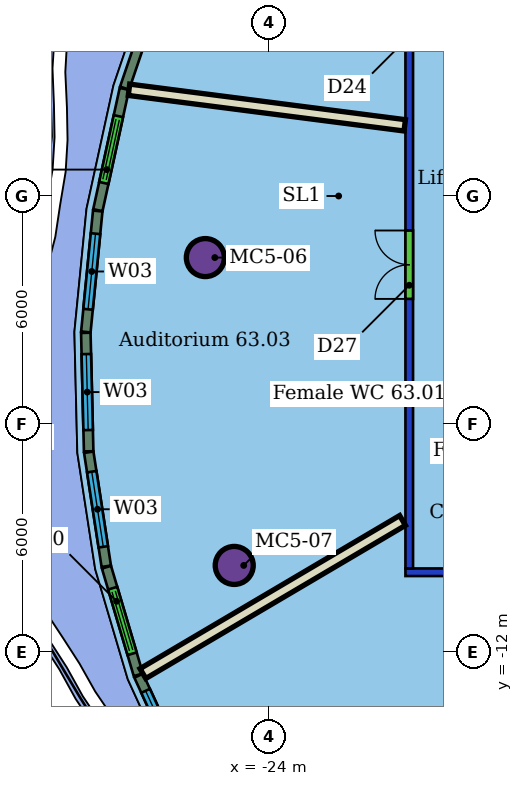
"""IFC4 building model, lengths in metres.
Left out: names, types, materials, properties, quantities, classifications, styles, units other than length and angle.
Written with IfcOpenShell. Run it as: python <this file> out.ifc"""

import sys

from ifc_helpers import new_model, si_unit, direction, frame, frame_2d, origin, origin_2d, place, context, subcontext, project, spatial, rectangle, hollow_circle, extrude, element, fill, save


model = new_model("IFC4")
c1 = context("Model", 3, precision=1e-05, world=origin(), true_north=direction((0.0, 1.0)))
c2 = subcontext(c1, "Body", "Model", "MODEL_VIEW")
j1 = project(units=[si_unit("LENGTHUNIT", "METRE"), si_unit("PLANEANGLEUNIT", "RADIAN")], contexts=[c1])
p1 = place(None, origin())
s1 = spatial("IfcSite", under=j1, at=p1, CompositionType="ELEMENT")
p2 = place(p1, origin())
s2 = spatial("IfcBuilding", under=s1, at=p2, CompositionType="ELEMENT")
p3 = place(p2, frame((0.0, 0.0, 257.7)))
s3 = spatial("IfcBuildingStorey", under=s2, at=p3, CompositionType="ELEMENT", Elevation=257.7)
for number, where, z_axis, x_axis in (
    (1, (-25.666, -1.62, 0.0), (0.0, 0.0, 1.0), (1.0, 0.0, 0.0)),
    (2, (-24.906, -9.72, 0.0), (0.0, 0.0, 1.0), (1.0, 0.0, 0.0)),
):
    element("IfcColumn", number, at=place(p3, frame(where, z_axis=z_axis, x_axis=x_axis)), inside=s3, PredefinedType="COLUMN", context=c2, shape_type="SweptSolid", body=[
        extrude(hollow_circle(Radius=0.5, WallThickness=0.04, at=origin_2d()), origin(), (0.0, 0.0, 1.0), 3.45),
    ])
p4 = place(p3, frame((8.4, -9.9, 0.0), z_axis=(0.0, 0.0, 1.0), x_axis=(-1.0, 0.0, 0.0)))
e3 = element("IfcWall", 3, at=p4, inside=s3, PredefinedType="PARTITIONING", context=c2, shape_type="SweptSolid", body=[
    extrude(rectangle(XDim=28.8, YDim=0.2, at=frame_2d((14.4, 0.0))), origin(), (0.0, 0.0, 1.0), 3.1),
])
p5 = place(p4, frame((23.159, 0.0, 0.0)))
e4 = element("IfcOpeningElement", 4, at=p5, cuts=e3, PredefinedType="OPENING", context=c2, shape_type="SweptSolid", body=[
    extrude(rectangle(XDim=1.8, YDim=2.4, at=frame_2d((0.9, 1.2))), frame((0.0, 0.11, 0.0), z_axis=(0.0, -1.0, 0.0), x_axis=(1.0, 0.0, 0.0)), (0.0, 0.0, 1.0), 0.22),
])
p6 = place(p4, frame((17.296, 0.0, 0.0)))
e5 = element("IfcOpeningElement", 5, at=p6, cuts=e3, PredefinedType="OPENING", context=c2, shape_type="SweptSolid", body=[
    extrude(rectangle(XDim=1.5, YDim=2.4, at=frame_2d((0.75, 1.2))), frame((0.0, 0.11, 0.0), z_axis=(0.0, -1.0, 0.0), x_axis=(1.0, 0.0, 0.0)), (0.0, 0.0, 1.0), 0.22),
])
p7 = place(p4, frame((8.284, 0.0, 0.0)))
e6 = element("IfcOpeningElement", 6, at=p7, cuts=e3, PredefinedType="OPENING", context=c2, shape_type="SweptSolid", body=[
    extrude(rectangle(XDim=0.9, YDim=2.1, at=frame_2d((0.45, 1.05))), frame((0.0, 0.11, 0.0), z_axis=(0.0, -1.0, 0.0), x_axis=(1.0, 0.0, 0.0)), (0.0, 0.0, 1.0), 0.22),
])
p8 = place(p4, frame((3.497, 0.0, 0.0)))
e7 = element("IfcOpeningElement", 7, at=p8, cuts=e3, PredefinedType="OPENING", context=c2, shape_type="SweptSolid", body=[
    extrude(rectangle(XDim=1.5, YDim=2.1, at=frame_2d((0.75, 1.05))), frame((0.0, 0.11, 0.0), z_axis=(0.0, -1.0, 0.0), x_axis=(1.0, 0.0, 0.0)), (0.0, 0.0, 1.0), 0.22),
])
p9 = place(p3, frame((-20.3, -9.8, 0.0), z_axis=(0.0, 0.0, 1.0), x_axis=(0.0, 1.0, 0.0)))
e8 = element("IfcWall", 8, at=p9, inside=s3, PredefinedType="PARTITIONING", context=c2, shape_type="SweptSolid", body=[
    extrude(rectangle(XDim=19.6, YDim=0.2, at=frame_2d((9.8, 0.0))), origin(), (0.0, 0.0, 1.0), 3.1),
])
p10 = place(p9, frame((13.85, 0.0, 0.0)))
e9 = element("IfcOpeningElement", 9, at=p10, cuts=e8, PredefinedType="OPENING", context=c2, shape_type="SweptSolid", body=[
    extrude(rectangle(XDim=1.5, YDim=2.1, at=frame_2d((0.75, 1.05))), frame((0.0, 0.11, 0.0), z_axis=(0.0, -1.0, 0.0), x_axis=(1.0, 0.0, 0.0)), (0.0, 0.0, 1.0), 0.22),
])
p11 = place(p9, frame((7.092, 0.0, 0.0)))
e10 = element("IfcOpeningElement", 10, at=p11, cuts=e8, PredefinedType="OPENING", context=c2, shape_type="SweptSolid", body=[
    extrude(rectangle(XDim=1.8, YDim=2.4, at=frame_2d((0.9, 1.2))), frame((0.0, 0.11, 0.0), z_axis=(0.0, -1.0, 0.0), x_axis=(1.0, 0.0, 0.0)), (0.0, 0.0, 1.0), 0.22),
])
p12 = place(p3, frame((-27.674, 2.795, 0.0), z_axis=(0.0, 0.0, 1.0), x_axis=(0.991788248046, -0.127890855958, 0.0)))
e11 = element("IfcWall", 11, at=p12, inside=s3, PredefinedType="PARTITIONING", context=c2, shape_type="SweptSolid", body=[
    extrude(rectangle(XDim=7.315, YDim=0.3, at=frame_2d((3.658, 0.0))), origin(), (0.0, 0.0, 1.0), 3.45),
])
p13 = place(p3, frame((-27.309, -12.566, 0.0), z_axis=(0.0, 0.0, 1.0), x_axis=(0.861365558052, 0.507985605506, 0.0)))
e12 = element("IfcWall", 12, at=p13, inside=s3, PredefinedType="PARTITIONING", context=c2, shape_type="SweptSolid", body=[
    extrude(rectangle(XDim=7.932, YDim=0.3, at=frame_2d((3.966, 0.0))), origin(), (0.0, 0.0, 1.0), 3.45),
])
p14 = place(p3, frame((-20.565, -21.335, 0.0), z_axis=(0.0, 0.0, 1.0), x_axis=(0.563811273549, 0.825903655289, 0.0)))
e13 = element("IfcWall", 13, at=p14, inside=s3, PredefinedType="PARTITIONING", context=c2, shape_type="SweptSolid", body=[
    extrude(rectangle(XDim=13.665, YDim=0.175, at=frame_2d((6.833, 0.0))), origin(), (0.0, 0.0, 1.0), 3.45),
])
p15 = place(p3, frame((-26.737, 5.941, 0.0), z_axis=(0.0, 0.0, 1.0), x_axis=(-0.32181056212, -0.946804077995, 0.0)))
e14 = element("IfcWall", 14, at=p15, inside=s3, PredefinedType="SOLIDWALL", context=c2, shape_type="SweptSolid", body=[
    extrude(rectangle(XDim=3.277, YDim=0.25, at=frame_2d((1.638, 0.0))), origin(), (0.0, 0.0, 1.0), 3.15),
])
p16 = place(p3, frame((-27.797, 2.818, 0.0), z_axis=(0.0, 0.0, 1.0), x_axis=(-0.213366888583, -0.97697214436, 0.0)))
e15 = element("IfcWall", 15, at=p16, inside=s3, PredefinedType="SOLIDWALL", context=c2, shape_type="SweptSolid", body=[
    extrude(rectangle(XDim=3.266, YDim=0.25, at=frame_2d((1.633, 0.0))), origin(), (0.0, 0.0, 1.0), 3.15),
])
p17 = place(p16, frame((0.733, 0.0, 0.0)))
e16 = element("IfcOpeningElement", 16, at=p17, cuts=e15, PredefinedType="OPENING", context=c2, shape_type="SweptSolid", body=[
    extrude(rectangle(XDim=1.8, YDim=2.4, at=frame_2d((0.9, 1.2))), frame((0.0, 0.135, 0.0), z_axis=(0.0, -1.0, 0.0), x_axis=(1.0, 0.0, 0.0)), (0.0, 0.0, 1.0), 0.27),
])
p18 = place(p3, frame((-28.497, -0.395, 0.0), z_axis=(0.0, 0.0, 1.0), x_axis=(-0.097900668903, -0.995196191225, 0.0)))
e17 = element("IfcWall", 17, at=p18, inside=s3, PredefinedType="SOLIDWALL", context=c2, shape_type="SweptSolid", body=[
    extrude(rectangle(XDim=3.197, YDim=0.25, at=frame_2d((1.599, 0.0))), origin(), (0.0, 0.0, 1.0), 3.15),
])
p19 = place(p18, frame((0.599, 0.0, 0.9)))
e18 = element("IfcOpeningElement", 18, at=p19, cuts=e17, PredefinedType="OPENING", context=c2, shape_type="SweptSolid", body=[
    extrude(rectangle(XDim=2.0, YDim=2.1, at=frame_2d((1.0, 1.05))), frame((0.0, 0.135, 0.0), z_axis=(0.0, -1.0, 0.0), x_axis=(1.0, 0.0, 0.0)), (0.0, 0.0, 1.0), 0.27),
])
p20 = place(p3, frame((-28.811, -3.6, 0.0), z_axis=(0.0, 0.0, 1.0), x_axis=(0.024112016682, -0.999709263062, 0.0)))
e19 = element("IfcWall", 19, at=p20, inside=s3, PredefinedType="SOLIDWALL", context=c2, shape_type="SweptSolid", body=[
    extrude(rectangle(XDim=3.119, YDim=0.25, at=frame_2d((1.559, 0.0))), origin(), (0.0, 0.0, 1.0), 3.15),
])
p21 = place(p20, frame((0.559, 0.0, 0.9)))
e20 = element("IfcOpeningElement", 20, at=p21, cuts=e19, PredefinedType="OPENING", context=c2, shape_type="SweptSolid", body=[
    extrude(rectangle(XDim=2.0, YDim=2.1, at=frame_2d((1.0, 1.05))), frame((0.0, 0.135, 0.0), z_axis=(0.0, -1.0, 0.0), x_axis=(1.0, 0.0, 0.0)), (0.0, 0.0, 1.0), 0.27),
])
p22 = place(p3, frame((-28.734, -6.742, 0.0), z_axis=(0.0, 0.0, 1.0), x_axis=(0.151930263347, -0.988391215602, 0.0)))
e21 = element("IfcWall", 21, at=p22, inside=s3, PredefinedType="SOLIDWALL", context=c2, shape_type="SweptSolid", body=[
    extrude(rectangle(XDim=3.035, YDim=0.25, at=frame_2d((1.518, 0.0))), origin(), (0.0, 0.0, 1.0), 3.15),
])
p23 = place(p22, frame((0.518, 0.0, 0.9)))
e22 = element("IfcOpeningElement", 22, at=p23, cuts=e21, PredefinedType="OPENING", context=c2, shape_type="SweptSolid", body=[
    extrude(rectangle(XDim=2.0, YDim=2.1, at=frame_2d((1.0, 1.05))), frame((0.0, 0.135, 0.0), z_axis=(0.0, -1.0, 0.0), x_axis=(1.0, 0.0, 0.0)), (0.0, 0.0, 1.0), 0.27),
])
p24 = place(p3, frame((-28.267, -9.767, 0.0), z_axis=(0.0, 0.0, 1.0), x_axis=(0.283795508972, -0.958884825768, 0.0)))
e23 = element("IfcWall", 23, at=p24, inside=s3, PredefinedType="SOLIDWALL", context=c2, shape_type="SweptSolid", body=[
    extrude(rectangle(XDim=2.952, YDim=0.25, at=frame_2d((1.476, 0.0))), origin(), (0.0, 0.0, 1.0), 3.15),
])
p25 = place(p24, frame((0.576, 0.0, 0.0)))
e24 = element("IfcOpeningElement", 24, at=p25, cuts=e23, PredefinedType="OPENING", context=c2, shape_type="SweptSolid", body=[
    extrude(rectangle(XDim=1.8, YDim=2.4, at=frame_2d((0.9, 1.2))), frame((0.0, 0.135, 0.0), z_axis=(0.0, -1.0, 0.0), x_axis=(1.0, 0.0, 0.0)), (0.0, 0.0, 1.0), 0.27),
])
p26 = place(p3, frame((-27.42, -12.622, 0.0), z_axis=(0.0, 0.0, 1.0), x_axis=(0.416844676261, -0.908977731231, 0.0)))
e25 = element("IfcWall", 25, at=p26, inside=s3, PredefinedType="SOLIDWALL", context=c2, shape_type="SweptSolid", body=[
    extrude(rectangle(XDim=2.876, YDim=0.25, at=frame_2d((1.438, 0.0))), origin(), (0.0, 0.0, 1.0), 3.15),
])
p27 = place(p26, frame((0.438, 0.0, 0.9)))
e26 = element("IfcOpeningElement", 26, at=p27, cuts=e25, PredefinedType="OPENING", context=c2, shape_type="SweptSolid", body=[
    extrude(rectangle(XDim=2.0, YDim=2.1, at=frame_2d((1.0, 1.05))), frame((0.0, 0.135, 0.0), z_axis=(0.0, -1.0, 0.0), x_axis=(1.0, 0.0, 0.0)), (0.0, 0.0, 1.0), 0.27),
])
p28 = place(p11, origin())
e27 = element("IfcDoor", 27, at=p28, inside=s3, OperationType="DOUBLE_DOOR_SINGLE_SWING", PredefinedType="DOOR", context=c2, shape_type="SweptSolid", body=[
    extrude(rectangle(XDim=1.8, YDim=2.4, at=frame_2d((0.9, 1.2))), frame((0.0, 0.025, 0.0), z_axis=(0.0, -1.0, 0.0), x_axis=(1.0, 0.0, 0.0)), (0.0, 0.0, 1.0), 0.05),
])
fill(e10, e27)
p29 = place(p17, origin())
e28 = element("IfcDoor", 28, at=p29, inside=s3, OperationType="DOUBLE_DOOR_SLIDING", PredefinedType="DOOR", context=c2, shape_type="SweptSolid", body=[
    extrude(rectangle(XDim=1.8, YDim=2.4, at=frame_2d((0.9, 1.2))), frame((0.0, 0.025, 0.0), z_axis=(0.0, -1.0, 0.0), x_axis=(1.0, 0.0, 0.0)), (0.0, 0.0, 1.0), 0.05),
])
fill(e16, e28)
p30 = place(p19, origin())
e29 = element("IfcWindow", 29, at=p30, inside=s3, PartitioningType="SINGLE_PANEL", PredefinedType="WINDOW", context=c2, shape_type="SweptSolid", body=[
    extrude(rectangle(XDim=2.0, YDim=2.1, at=frame_2d((1.0, 1.05))), frame((0.0, 0.03, 0.0), z_axis=(0.0, -1.0, 0.0), x_axis=(1.0, 0.0, 0.0)), (0.0, 0.0, 1.0), 0.06),
])
fill(e18, e29)
p31 = place(p21, origin())
e30 = element("IfcWindow", 30, at=p31, inside=s3, PartitioningType="SINGLE_PANEL", PredefinedType="WINDOW", context=c2, shape_type="SweptSolid", body=[
    extrude(rectangle(XDim=2.0, YDim=2.1, at=frame_2d((1.0, 1.05))), frame((0.0, 0.03, 0.0), z_axis=(0.0, -1.0, 0.0), x_axis=(1.0, 0.0, 0.0)), (0.0, 0.0, 1.0), 0.06),
])
fill(e20, e30)
p32 = place(p23, origin())
e31 = element("IfcWindow", 31, at=p32, inside=s3, PartitioningType="SINGLE_PANEL", PredefinedType="WINDOW", context=c2, shape_type="SweptSolid", body=[
    extrude(rectangle(XDim=2.0, YDim=2.1, at=frame_2d((1.0, 1.05))), frame((0.0, 0.03, 0.0), z_axis=(0.0, -1.0, 0.0), x_axis=(1.0, 0.0, 0.0)), (0.0, 0.0, 1.0), 0.06),
])
fill(e22, e31)
p33 = place(p25, origin())
e32 = element("IfcDoor", 32, at=p33, inside=s3, OperationType="DOUBLE_DOOR_SLIDING", PredefinedType="DOOR", context=c2, shape_type="SweptSolid", body=[
    extrude(rectangle(XDim=1.8, YDim=2.4, at=frame_2d((0.9, 1.2))), frame((0.0, 0.025, 0.0), z_axis=(0.0, -1.0, 0.0), x_axis=(1.0, 0.0, 0.0)), (0.0, 0.0, 1.0), 0.05),
])
fill(e24, e32)
p34 = place(p27, origin())
e33 = element("IfcWindow", 33, at=p34, inside=s3, PartitioningType="SINGLE_PANEL", PredefinedType="WINDOW", context=c2, shape_type="SweptSolid", body=[
    extrude(rectangle(XDim=2.0, YDim=2.1, at=frame_2d((1.0, 1.05))), frame((0.0, 0.03, 0.0), z_axis=(0.0, -1.0, 0.0), x_axis=(1.0, 0.0, 0.0)), (0.0, 0.0, 1.0), 0.06),
])
fill(e26, e33)
save(model, sys.argv[1])
